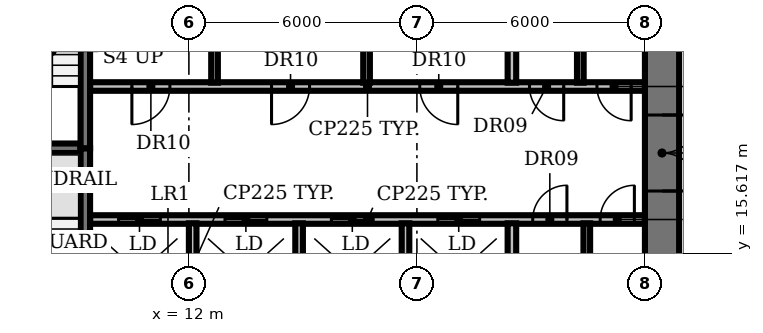
"""IFC4 building model, lengths in metres.
Left out: names, types, materials, properties, quantities, classifications, styles, units other than length and angle.
Written with IfcOpenShell. Run it as: python <this file> out.ifc"""

import sys

from ifc_helpers import new_model, si_unit, direction, frame, frame_2d, origin, place, context, subcontext, project, spatial, rectangle, extrude, element, fill, save


model = new_model("IFC4")
c1 = context("Model", 3, precision=1e-05, world=origin(), true_north=direction((0.0, 1.0)))
c2 = subcontext(c1, "Body", "Model", "MODEL_VIEW")
j1 = project(units=[si_unit("LENGTHUNIT", "METRE"), si_unit("PLANEANGLEUNIT", "RADIAN")], contexts=[c1])
p1 = place(None, origin())
s1 = spatial("IfcSite", under=j1, at=p1, CompositionType="ELEMENT")
p2 = place(p1, origin())
s2 = spatial("IfcBuilding", under=s1, at=p2, CompositionType="ELEMENT")
p3 = place(p2, frame((0.0, 0.0, 24.5)))
s3 = spatial("IfcBuildingStorey", under=s2, at=p3, CompositionType="ELEMENT", Elevation=24.5)
p4 = place(p3, frame((9.4, 16.5, 0.0), z_axis=(0.0, 0.0, 1.0), x_axis=(1.0, 0.0, 0.0)))
e1 = element("IfcWall", 1, at=p4, inside=s3, PredefinedType="PARTITIONING", context=c2, shape_type="SweptSolid", body=[
    extrude(rectangle(XDim=14.6, YDim=0.225, at=frame_2d((7.3, 0.0))), origin(), (0.0, 0.0, 1.0), 4.15),
])
p5 = place(p4, frame((0.75, 0.0, 0.0)))
e2 = element("IfcOpeningElement", 2, at=p5, cuts=e1, PredefinedType="OPENING", context=c2, shape_type="SweptSolid", body=[
    extrude(rectangle(XDim=1.1, YDim=2.1, at=frame_2d((0.55, 1.05))), frame((0.0, 0.123, 0.0), z_axis=(0.0, -1.0, 0.0), x_axis=(1.0, 0.0, 0.0)), (0.0, 0.0, 1.0), 0.245),
])
p6 = place(p4, frame((3.55, 0.0, 0.0)))
e3 = element("IfcOpeningElement", 3, at=p6, cuts=e1, PredefinedType="OPENING", context=c2, shape_type="SweptSolid", body=[
    extrude(rectangle(XDim=1.1, YDim=2.1, at=frame_2d((0.55, 1.05))), frame((0.0, 0.123, 0.0), z_axis=(0.0, -1.0, 0.0), x_axis=(1.0, 0.0, 0.0)), (0.0, 0.0, 1.0), 0.245),
])
p7 = place(p4, frame((6.35, 0.0, 0.0)))
e4 = element("IfcOpeningElement", 4, at=p7, cuts=e1, PredefinedType="OPENING", context=c2, shape_type="SweptSolid", body=[
    extrude(rectangle(XDim=1.1, YDim=2.1, at=frame_2d((0.55, 1.05))), frame((0.0, 0.123, 0.0), z_axis=(0.0, -1.0, 0.0), x_axis=(1.0, 0.0, 0.0)), (0.0, 0.0, 1.0), 0.245),
])
p8 = place(p4, frame((9.15, 0.0, 0.0)))
e5 = element("IfcOpeningElement", 5, at=p8, cuts=e1, PredefinedType="OPENING", context=c2, shape_type="SweptSolid", body=[
    extrude(rectangle(XDim=1.1, YDim=2.1, at=frame_2d((0.55, 1.05))), frame((0.0, 0.123, 0.0), z_axis=(0.0, -1.0, 0.0), x_axis=(1.0, 0.0, 0.0)), (0.0, 0.0, 1.0), 0.245),
])
p9 = place(p4, frame((11.647, 0.0, 0.0)))
e6 = element("IfcOpeningElement", 6, at=p9, cuts=e1, PredefinedType="OPENING", context=c2, shape_type="SweptSolid", body=[
    extrude(rectangle(XDim=0.9, YDim=2.1, at=frame_2d((0.45, 1.05))), frame((0.0, 0.123, 0.0), z_axis=(0.0, -1.0, 0.0), x_axis=(1.0, 0.0, 0.0)), (0.0, 0.0, 1.0), 0.245),
])
p10 = place(p4, frame((13.423, 0.0, 0.0)))
e7 = element("IfcOpeningElement", 7, at=p10, cuts=e1, PredefinedType="OPENING", context=c2, shape_type="SweptSolid", body=[
    extrude(rectangle(XDim=0.9, YDim=2.1, at=frame_2d((0.45, 1.05))), frame((0.0, 0.123, 0.0), z_axis=(0.0, -1.0, 0.0), x_axis=(1.0, 0.0, 0.0)), (0.0, 0.0, 1.0), 0.245),
])
p11 = place(p3, frame((6.0, 18.375, 0.0), z_axis=(0.0, 0.0, 1.0), x_axis=(1.0, 0.0, 0.0)))
e8 = element("IfcWall", 8, at=p11, inside=s3, PredefinedType="SHEAR", context=c2, shape_type="SweptSolid", body=[
    extrude(rectangle(XDim=3.15, YDim=0.25, at=frame_2d((1.575, 0.0))), origin(), (0.0, 0.0, 1.0), 4.15),
])
p12 = place(p3, frame((24.0, 20.0, 0.0), z_axis=(0.0, 0.0, 1.0), x_axis=(-1.0, 0.0, 0.0)))
e9 = element("IfcWall", 9, at=p12, inside=s3, PredefinedType="PARTITIONING", context=c2, shape_type="SweptSolid", body=[
    extrude(rectangle(XDim=14.6, YDim=0.225, at=frame_2d((7.3, 0.0))), origin(), (0.0, 0.0, 1.0), 4.15),
])
p13 = place(p12, frame((12.5, 0.0, 0.0)))
e10 = element("IfcOpeningElement", 10, at=p13, cuts=e9, PredefinedType="OPENING", context=c2, shape_type="SweptSolid", body=[
    extrude(rectangle(XDim=1.0, YDim=2.1, at=frame_2d((0.5, 1.05))), frame((0.0, 0.123, 0.0), z_axis=(0.0, -1.0, 0.0), x_axis=(1.0, 0.0, 0.0)), (0.0, 0.0, 1.0), 0.245),
])
p14 = place(p12, frame((8.825, 0.0, 0.0)))
e11 = element("IfcOpeningElement", 11, at=p14, cuts=e9, PredefinedType="OPENING", context=c2, shape_type="SweptSolid", body=[
    extrude(rectangle(XDim=1.0, YDim=2.1, at=frame_2d((0.5, 1.05))), frame((0.0, 0.123, 0.0), z_axis=(0.0, -1.0, 0.0), x_axis=(1.0, 0.0, 0.0)), (0.0, 0.0, 1.0), 0.245),
])
p15 = place(p12, frame((4.925, 0.0, 0.0)))
e12 = element("IfcOpeningElement", 12, at=p15, cuts=e9, PredefinedType="OPENING", context=c2, shape_type="SweptSolid", body=[
    extrude(rectangle(XDim=1.0, YDim=2.1, at=frame_2d((0.5, 1.05))), frame((0.0, 0.123, 0.0), z_axis=(0.0, -1.0, 0.0), x_axis=(1.0, 0.0, 0.0)), (0.0, 0.0, 1.0), 0.245),
])
p16 = place(p12, frame((2.137, 0.0, 0.0)))
e13 = element("IfcOpeningElement", 13, at=p16, cuts=e9, PredefinedType="OPENING", context=c2, shape_type="SweptSolid", body=[
    extrude(rectangle(XDim=0.9, YDim=2.1, at=frame_2d((0.45, 1.05))), frame((0.0, 0.123, 0.0), z_axis=(0.0, -1.0, 0.0), x_axis=(1.0, 0.0, 0.0)), (0.0, 0.0, 1.0), 0.245),
])
p17 = place(p12, frame((0.363, 0.0, 0.0)))
e14 = element("IfcOpeningElement", 14, at=p17, cuts=e9, PredefinedType="OPENING", context=c2, shape_type="SweptSolid", body=[
    extrude(rectangle(XDim=0.9, YDim=2.1, at=frame_2d((0.45, 1.05))), frame((0.0, 0.123, 0.0), z_axis=(0.0, -1.0, 0.0), x_axis=(1.0, 0.0, 0.0)), (0.0, 0.0, 1.0), 0.245),
])
p18 = place(p3, frame((9.275, 18.375, 0.0), z_axis=(0.0, 0.0, 1.0), x_axis=(0.0, -1.0, 0.0)))
e15 = element("IfcWall", 15, at=p18, inside=s3, PredefinedType="SHEAR", context=c2, shape_type="SweptSolid", body=[
    extrude(rectangle(XDim=6.55, YDim=0.25, at=frame_2d((3.275, 0.0))), origin(), (0.0, 0.0, 1.0), 4.15),
])
p19 = place(p18, frame((5.075, 0.0, 0.0)))
e16 = element("IfcOpeningElement", 16, at=p19, cuts=e15, PredefinedType="OPENING", context=c2, shape_type="SweptSolid", body=[
    extrude(rectangle(XDim=1.0, YDim=2.1, at=frame_2d((0.5, 1.05))), frame((0.0, 0.135, 0.0), z_axis=(0.0, -1.0, 0.0), x_axis=(1.0, 0.0, 0.0)), (0.0, 0.0, 1.0), 0.27),
])
p20 = place(p3, frame((9.275, 18.375, 0.0), z_axis=(0.0, 0.0, 1.0), x_axis=(0.0, 1.0, 0.0)))
e17 = element("IfcWall", 17, at=p20, inside=s3, PredefinedType="SHEAR", context=c2, shape_type="SweptSolid", body=[
    extrude(rectangle(XDim=6.425, YDim=0.25, at=frame_2d((3.212, 0.0))), origin(), (0.0, 0.0, 1.0), 4.15),
])
p21 = place(p3, frame((12.1, 13.8, 0.0), z_axis=(0.0, 0.0, 1.0), x_axis=(0.0, 1.0, 0.0)))
e18 = element("IfcWall", 18, at=p21, inside=s3, PredefinedType="SOLIDWALL", context=c2, shape_type="SweptSolid", body=[
    extrude(rectangle(XDim=2.6, YDim=0.2, at=frame_2d((1.3, 0.0))), origin(), (0.0, 0.0, 1.0), 4.15),
])
p22 = place(p3, frame((12.675, 20.1, 0.0), z_axis=(0.0, 0.0, 1.0), x_axis=(0.0, 1.0, 0.0)))
e19 = element("IfcWall", 19, at=p22, inside=s3, PredefinedType="PARTITIONING", context=c2, shape_type="SweptSolid", body=[
    extrude(rectangle(XDim=2.6, YDim=0.175, at=frame_2d((1.3, 0.0))), origin(), (0.0, 0.0, 1.0), 4.15),
])
p23 = place(p3, frame((14.9, 13.8, 0.0), z_axis=(0.0, 0.0, 1.0), x_axis=(0.0, 1.0, 0.0)))
e20 = element("IfcWall", 20, at=p23, inside=s3, PredefinedType="SOLIDWALL", context=c2, shape_type="SweptSolid", body=[
    extrude(rectangle(XDim=2.6, YDim=0.2, at=frame_2d((1.3, 0.0))), origin(), (0.0, 0.0, 1.0), 4.15),
])
p24 = place(p3, frame((16.675, 20.1, 0.0), z_axis=(0.0, 0.0, 1.0), x_axis=(0.0, 1.0, 0.0)))
e21 = element("IfcWall", 21, at=p24, inside=s3, PredefinedType="PARTITIONING", context=c2, shape_type="SweptSolid", body=[
    extrude(rectangle(XDim=2.6, YDim=0.175, at=frame_2d((1.3, 0.0))), origin(), (0.0, 0.0, 1.0), 4.15),
])
p25 = place(p3, frame((17.7, 13.8, 0.0), z_axis=(0.0, 0.0, 1.0), x_axis=(0.0, 1.0, 0.0)))
e22 = element("IfcWall", 22, at=p25, inside=s3, PredefinedType="SOLIDWALL", context=c2, shape_type="SweptSolid", body=[
    extrude(rectangle(XDim=2.6, YDim=0.2, at=frame_2d((1.3, 0.0))), origin(), (0.0, 0.0, 1.0), 4.15),
])
for number, where, z_axis, x_axis in (
    (23, (20.5, 13.8, 0.0), (0.0, 0.0, 1.0), (0.0, 1.0, 0.0)),
    (24, (20.5, 20.1, 0.0), (0.0, 0.0, 1.0), (0.0, 1.0, 0.0)),
):
    element("IfcWall", number, at=place(p3, frame(where, z_axis=z_axis, x_axis=x_axis)), inside=s3, PredefinedType="PARTITIONING", context=c2, shape_type="SweptSolid", body=[
        extrude(rectangle(XDim=2.6, YDim=0.225, at=frame_2d((1.3, 0.0))), origin(), (0.0, 0.0, 1.0), 4.15),
    ])
for number, where, z_axis, x_axis in (
    (25, (22.3, 20.1, 0.0), (0.0, 0.0, 1.0), (0.0, 1.0, 0.0)),
    (26, (22.47, 13.8, 0.0), (0.0, 0.0, 1.0), (0.0, 1.0, 0.0)),
):
    element("IfcWall", number, at=place(p3, frame(where, z_axis=z_axis, x_axis=x_axis)), inside=s3, PredefinedType="PARTITIONING", context=c2, shape_type="SweptSolid", body=[
        extrude(rectangle(XDim=2.6, YDim=0.175, at=frame_2d((1.3, 0.0))), origin(), (0.0, 0.0, 1.0), 4.15),
    ])
p26 = place(p3, frame((24.45, 25.7, 0.0), z_axis=(0.0, 0.0, 1.0), x_axis=(0.0, -1.0, 0.0)))
e27 = element("IfcWall", 27, at=p26, inside=s3, PredefinedType="SHEAR", context=c2, shape_type="SweptSolid", body=[
    extrude(rectangle(XDim=21.2, YDim=0.9, at=frame_2d((10.6, 0.0))), origin(), (0.0, 0.0, 1.0), 4.15),
])
p27 = place(p26, frame((12.45, 0.0, 0.0)))
e28 = element("IfcOpeningElement", 28, at=p27, cuts=e27, PredefinedType="OPENING", context=c2, shape_type="SweptSolid", body=[
    extrude(rectangle(XDim=0.9, YDim=2.1, at=frame_2d((0.45, 1.05))), frame((0.0, 0.46, 0.0), z_axis=(0.0, -1.0, 0.0), x_axis=(1.0, 0.0, 0.0)), (0.0, 0.0, 1.0), 0.92),
])
p28 = place(p26, frame((6.45, 0.0, 0.0)))
e29 = element("IfcOpeningElement", 29, at=p28, cuts=e27, PredefinedType="OPENING", context=c2, shape_type="SweptSolid", body=[
    extrude(rectangle(XDim=2.0, YDim=2.1, at=frame_2d((1.0, 1.05))), frame((0.0, 0.46, 0.0), z_axis=(0.0, -1.0, 0.0), x_axis=(1.0, 0.0, 0.0)), (0.0, 0.0, 1.0), 0.92),
])
p29 = place(p5, origin())
e30 = element("IfcDoor", 30, at=p29, inside=s3, OperationType="DOUBLE_DOOR_SLIDING", PredefinedType="DOOR", context=c2, shape_type="SweptSolid", body=[
    extrude(rectangle(XDim=1.1, YDim=2.1, at=frame_2d((0.55, 1.05))), frame((0.0, 0.025, 0.0), z_axis=(0.0, -1.0, 0.0), x_axis=(1.0, 0.0, 0.0)), (0.0, 0.0, 1.0), 0.05),
])
fill(e2, e30)
p30 = place(p6, origin())
e31 = element("IfcDoor", 31, at=p30, inside=s3, OperationType="DOUBLE_DOOR_SLIDING", PredefinedType="DOOR", context=c2, shape_type="SweptSolid", body=[
    extrude(rectangle(XDim=1.1, YDim=2.1, at=frame_2d((0.55, 1.05))), frame((0.0, 0.025, 0.0), z_axis=(0.0, -1.0, 0.0), x_axis=(1.0, 0.0, 0.0)), (0.0, 0.0, 1.0), 0.05),
])
fill(e3, e31)
p31 = place(p7, origin())
e32 = element("IfcDoor", 32, at=p31, inside=s3, OperationType="DOUBLE_DOOR_SLIDING", PredefinedType="DOOR", context=c2, shape_type="SweptSolid", body=[
    extrude(rectangle(XDim=1.1, YDim=2.1, at=frame_2d((0.55, 1.05))), frame((0.0, 0.025, 0.0), z_axis=(0.0, -1.0, 0.0), x_axis=(1.0, 0.0, 0.0)), (0.0, 0.0, 1.0), 0.05),
])
fill(e4, e32)
p32 = place(p8, origin())
e33 = element("IfcDoor", 33, at=p32, inside=s3, OperationType="DOUBLE_DOOR_SLIDING", PredefinedType="DOOR", context=c2, shape_type="SweptSolid", body=[
    extrude(rectangle(XDim=1.1, YDim=2.1, at=frame_2d((0.55, 1.05))), frame((0.0, 0.025, 0.0), z_axis=(0.0, -1.0, 0.0), x_axis=(1.0, 0.0, 0.0)), (0.0, 0.0, 1.0), 0.05),
])
fill(e5, e33)
p33 = place(p9, origin())
e34 = element("IfcDoor", 34, at=p33, inside=s3, OperationType="SINGLE_SWING_RIGHT", PredefinedType="DOOR", context=c2, shape_type="SweptSolid", body=[
    extrude(rectangle(XDim=0.9, YDim=2.1, at=frame_2d((0.45, 1.05))), frame((0.0, 0.025, 0.0), z_axis=(0.0, -1.0, 0.0), x_axis=(1.0, 0.0, 0.0)), (0.0, 0.0, 1.0), 0.05),
])
fill(e6, e34)
p34 = place(p10, origin())
e35 = element("IfcDoor", 35, at=p34, inside=s3, OperationType="SINGLE_SWING_RIGHT", PredefinedType="DOOR", context=c2, shape_type="SweptSolid", body=[
    extrude(rectangle(XDim=0.9, YDim=2.1, at=frame_2d((0.45, 1.05))), frame((0.0, 0.025, 0.0), z_axis=(0.0, -1.0, 0.0), x_axis=(1.0, 0.0, 0.0)), (0.0, 0.0, 1.0), 0.05),
])
fill(e7, e35)
p35 = place(p13, origin())
e36 = element("IfcDoor", 36, at=p35, inside=s3, OperationType="SINGLE_SWING_RIGHT", PredefinedType="DOOR", context=c2, shape_type="SweptSolid", body=[
    extrude(rectangle(XDim=1.0, YDim=2.1, at=frame_2d((0.5, 1.05))), frame((0.0, 0.025, 0.0), z_axis=(0.0, -1.0, 0.0), x_axis=(1.0, 0.0, 0.0)), (0.0, 0.0, 1.0), 0.05),
])
fill(e10, e36)
p36 = place(p14, origin())
e37 = element("IfcDoor", 37, at=p36, inside=s3, OperationType="SINGLE_SWING_RIGHT", PredefinedType="DOOR", context=c2, shape_type="SweptSolid", body=[
    extrude(rectangle(XDim=1.0, YDim=2.1, at=frame_2d((0.5, 1.05))), frame((0.0, 0.025, 0.0), z_axis=(0.0, -1.0, 0.0), x_axis=(1.0, 0.0, 0.0)), (0.0, 0.0, 1.0), 0.05),
])
fill(e11, e37)
p37 = place(p15, origin())
e38 = element("IfcDoor", 38, at=p37, inside=s3, OperationType="SINGLE_SWING_LEFT", PredefinedType="DOOR", context=c2, shape_type="SweptSolid", body=[
    extrude(rectangle(XDim=1.0, YDim=2.1, at=frame_2d((0.5, 1.05))), frame((0.0, 0.025, 0.0), z_axis=(0.0, -1.0, 0.0), x_axis=(1.0, 0.0, 0.0)), (0.0, 0.0, 1.0), 0.05),
])
fill(e12, e38)
p38 = place(p16, origin())
e39 = element("IfcDoor", 39, at=p38, inside=s3, OperationType="SINGLE_SWING_LEFT", PredefinedType="DOOR", context=c2, shape_type="SweptSolid", body=[
    extrude(rectangle(XDim=0.9, YDim=2.1, at=frame_2d((0.45, 1.05))), frame((0.0, 0.025, 0.0), z_axis=(0.0, -1.0, 0.0), x_axis=(1.0, 0.0, 0.0)), (0.0, 0.0, 1.0), 0.05),
])
fill(e13, e39)
p39 = place(p17, origin())
e40 = element("IfcDoor", 40, at=p39, inside=s3, OperationType="SINGLE_SWING_LEFT", PredefinedType="DOOR", context=c2, shape_type="SweptSolid", body=[
    extrude(rectangle(XDim=0.9, YDim=2.1, at=frame_2d((0.45, 1.05))), frame((0.0, 0.025, 0.0), z_axis=(0.0, -1.0, 0.0), x_axis=(1.0, 0.0, 0.0)), (0.0, 0.0, 1.0), 0.05),
])
fill(e14, e40)
p40 = place(p28, origin())
e41 = element("IfcDoor", 41, at=p40, inside=s3, OperationType="DOUBLE_DOOR_SINGLE_SWING", PredefinedType="DOOR", context=c2, shape_type="SweptSolid", body=[
    extrude(rectangle(XDim=2.0, YDim=2.1, at=frame_2d((1.0, 1.05))), frame((0.0, 0.025, 0.0), z_axis=(0.0, -1.0, 0.0), x_axis=(1.0, 0.0, 0.0)), (0.0, 0.0, 1.0), 0.05),
])
fill(e29, e41)
save(model, sys.argv[1])
